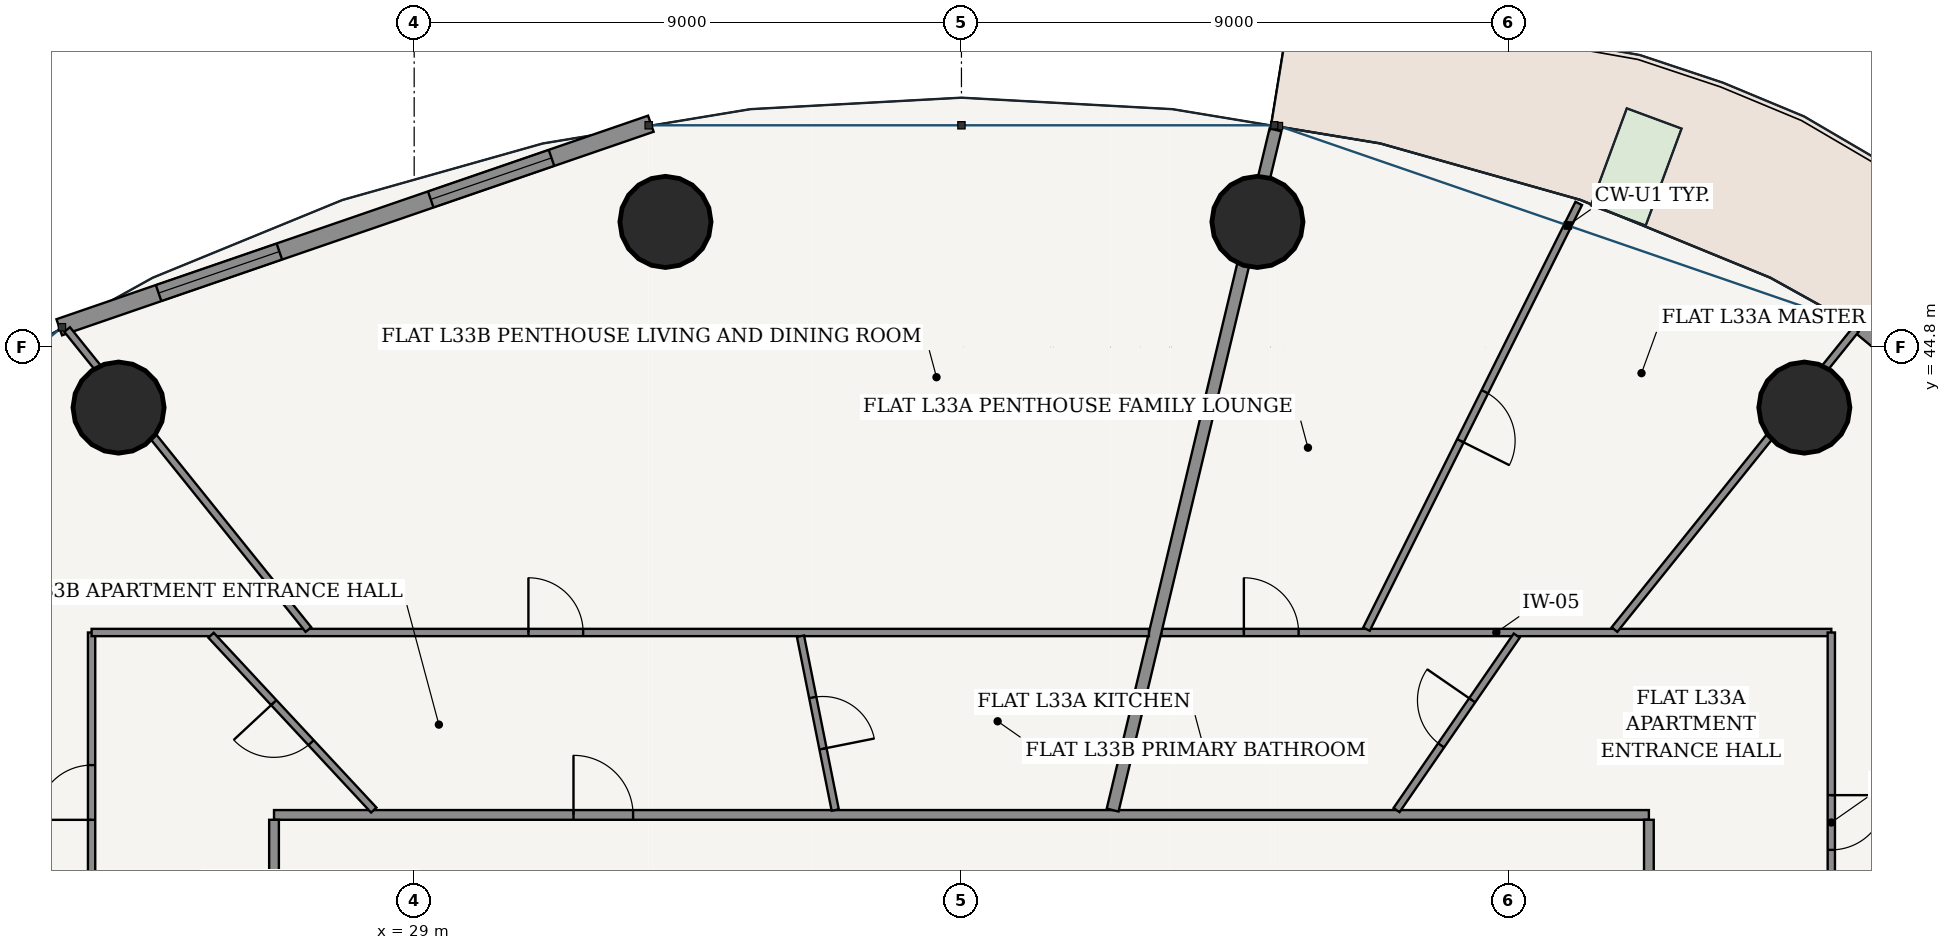
"""IFC4 building model, lengths in metres.
Left out: names, types, materials, properties, quantities, classifications, styles, units other than length and angle.
Written with IfcOpenShell. Run it as: python <this file> out.ifc"""

import sys

from ifc_helpers import new_model, si_unit, direction, frame, frame_2d, origin, origin_2d, place, context, subcontext, project, spatial, rectangle, hollow_circle, extrude, source, transform, mapped, element, fill, save


model = new_model("IFC4")
c1 = context("Model", 3, precision=1e-05, world=origin(), true_north=direction((-0.2419218956, 0.970295726276)))
c2 = subcontext(c1, "Body", "Model", "MODEL_VIEW")
j1 = project(units=[si_unit("LENGTHUNIT", "METRE"), si_unit("PLANEANGLEUNIT", "RADIAN")], contexts=[c1])
p1 = place(None, origin())
s1 = spatial("IfcSite", under=j1, at=p1, CompositionType="ELEMENT")
p2 = place(p1, origin())
s2 = spatial("IfcBuilding", under=s1, at=p2, CompositionType="ELEMENT")
p3 = place(p2, frame((0.0, 0.0, 126.6)))
s3 = spatial("IfcBuildingStorey", under=s2, at=p3, CompositionType="ELEMENT", Elevation=126.6)
for number, where, z_axis, x_axis in (
    (1, (51.862, 43.803, 0.0), (0.0, 0.0, 1.0), (1.0, 0.0, 0.0)),
    (2, (42.867, 46.857, 0.0), (0.0, 0.0, 1.0), (1.0, 0.0, 0.0)),
    (3, (33.133, 46.857, 0.0), (0.0, 0.0, 1.0), (1.0, 0.0, 0.0)),
    (4, (24.138, 43.803, 0.0), (0.0, 0.0, 1.0), (1.0, 0.0, 0.0)),
):
    element("IfcColumn", number, at=place(p3, frame(where, z_axis=z_axis, x_axis=x_axis)), inside=s3, PredefinedType="COLUMN", context=c2, shape_type="SweptSolid", body=[
        extrude(hollow_circle(Radius=0.75, WallThickness=0.045, at=origin_2d()), origin(), (0.0, 0.0, 1.0), 3.6),
    ])
p4 = place(p3, frame((60.154, 39.01, 0.0), z_axis=(0.0, 0.0, 1.0), x_axis=(-0.769242574941, 0.638956853706, 0.0)))
e5 = element("IfcWall", 5, at=p4, inside=s3, PredefinedType="SOLIDWALL", context=c2, shape_type="SweptSolid", body=[
    extrude(rectangle(XDim=9.69, YDim=0.26, at=frame_2d((4.845, 0.0))), origin(), (0.0, 0.0, 1.0), 3.15),
])
p5 = place(p4, frame((4.17, 0.0, 0.0)))
e6 = element("IfcOpeningElement", 6, at=p5, cuts=e5, PredefinedType="OPENING", context=c2, shape_type="SweptSolid", body=[
    extrude(rectangle(XDim=1.35, YDim=2.2, at=frame_2d((0.675, 1.1))), frame((0.0, 0.14, 0.0), z_axis=(0.0, -1.0, 0.0), x_axis=(1.0, 0.0, 0.0)), (0.0, 0.0, 1.0), 0.28),
])
p6 = place(p3, frame((32.892, 48.472, 0.0), z_axis=(0.0, 0.0, 1.0), x_axis=(-0.945597432299, -0.325339047809, 0.0)))
e7 = element("IfcWall", 7, at=p6, inside=s3, PredefinedType="SOLIDWALL", context=c2, shape_type="SweptSolid", body=[
    extrude(rectangle(XDim=10.289, YDim=0.28, at=frame_2d((5.145, 0.0))), origin(), (0.0, 0.0, 1.0), 3.15),
])
p7 = place(p6, frame((1.728, 0.0, 0.85)))
e8 = element("IfcOpeningElement", 8, at=p7, cuts=e7, PredefinedType="OPENING", context=c2, shape_type="SweptSolid", body=[
    extrude(rectangle(XDim=2.1, YDim=1.95, at=frame_2d((1.05, 0.975))), frame((0.0, 0.15, 0.0), z_axis=(0.0, -1.0, 0.0), x_axis=(1.0, 0.0, 0.0)), (0.0, 0.0, 1.0), 0.3),
])
p8 = place(p6, frame((6.461, 0.0, 0.85)))
e9 = element("IfcOpeningElement", 9, at=p8, cuts=e7, PredefinedType="OPENING", context=c2, shape_type="SweptSolid", body=[
    extrude(rectangle(XDim=2.1, YDim=1.95, at=frame_2d((1.05, 0.975))), frame((0.0, 0.15, 0.0), z_axis=(0.0, -1.0, 0.0), x_axis=(1.0, 0.0, 0.0)), (0.0, 0.0, 1.0), 0.3),
])
p9 = place(p3, frame((26.695, 37.105, 0.0), z_axis=(0.0, 0.0, 1.0), x_axis=(1.0, 0.0, 0.0)))
e10 = element("IfcWall", 10, at=p9, inside=s3, PredefinedType="PARTITIONING", context=c2, shape_type="SweptSolid", body=[
    extrude(rectangle(XDim=22.61, YDim=0.16, at=frame_2d((11.305, 0.0))), origin(), (0.0, 0.0, 1.0), 2.596),
])
p10 = place(p9, frame((4.925, 0.0, 0.0)))
e11 = element("IfcOpeningElement", 11, at=p10, cuts=e10, PredefinedType="OPENING", context=c2, shape_type="SweptSolid", body=[
    extrude(rectangle(XDim=0.98, YDim=2.2, at=frame_2d((0.49, 1.1))), frame((0.0, 0.09, 0.0), z_axis=(0.0, -1.0, 0.0), x_axis=(1.0, 0.0, 0.0)), (0.0, 0.0, 1.0), 0.18),
])
p11 = place(p3, frame((26.695, 16.575, 0.0), z_axis=(0.0, 0.0, 1.0), x_axis=(0.0, 1.0, 0.0)))
e12 = element("IfcWall", 12, at=p11, inside=s3, PredefinedType="PARTITIONING", context=c2, shape_type="SweptSolid", body=[
    extrude(rectangle(XDim=20.45, YDim=0.16, at=frame_2d((10.225, 0.0))), origin(), (0.0, 0.0, 1.0), 2.596),
])
p12 = place(p11, frame((9.547, 0.0, 0.0)))
e13 = element("IfcOpeningElement", 13, at=p12, cuts=e12, PredefinedType="OPENING", context=c2, shape_type="SweptSolid", body=[
    extrude(rectangle(XDim=0.98, YDim=2.2, at=frame_2d((0.49, 1.1))), frame((0.0, 0.09, 0.0), z_axis=(0.0, -1.0, 0.0), x_axis=(1.0, 0.0, 0.0)), (0.0, 0.0, 1.0), 0.18),
])
p13 = place(p3, frame((49.305, 16.575, 0.0), z_axis=(0.0, 0.0, 1.0), x_axis=(0.0, 1.0, 0.0)))
e14 = element("IfcWall", 14, at=p13, inside=s3, PredefinedType="PARTITIONING", context=c2, shape_type="SweptSolid", body=[
    extrude(rectangle(XDim=20.45, YDim=0.16, at=frame_2d((10.225, 0.0))), origin(), (0.0, 0.0, 1.0), 2.596),
])
p14 = place(p13, frame((17.66, 0.0, 0.0)))
e15 = element("IfcOpeningElement", 15, at=p14, cuts=e14, PredefinedType="OPENING", context=c2, shape_type="SweptSolid", body=[
    extrude(rectangle(XDim=0.98, YDim=2.2, at=frame_2d((0.49, 1.1))), frame((0.0, 0.09, 0.0), z_axis=(0.0, -1.0, 0.0), x_axis=(1.0, 0.0, 0.0)), (0.0, 0.0, 1.0), 0.18),
])
p15 = place(p13, frame((1.374, 0.0, 0.0)))
e16 = element("IfcOpeningElement", 16, at=p15, cuts=e14, PredefinedType="OPENING", context=c2, shape_type="SweptSolid", body=[
    extrude(rectangle(XDim=0.98, YDim=2.2, at=frame_2d((0.49, 1.1))), frame((0.0, 0.09, 0.0), z_axis=(0.0, -1.0, 0.0), x_axis=(1.0, 0.0, 0.0)), (0.0, 0.0, 1.0), 0.18),
])
p16 = place(p3, frame((41.287, 40.105, 0.0), z_axis=(0.0, 0.0, 1.0), x_axis=(1.0, 0.0, 0.0)))
e17 = element("IfcWall", 17, at=p16, inside=s3, PredefinedType="PARTITIONING", context=c2, shape_type="SweptSolid", body=[
    extrude(rectangle(XDim=11.018, YDim=0.12, at=frame_2d((5.509, 0.0))), origin(), (0.0, 0.0, 1.0), 2.596),
])
p17 = place(p16, frame((1.357, 0.0, 0.0)))
e18 = element("IfcOpeningElement", 18, at=p17, cuts=e17, PredefinedType="OPENING", context=c2, shape_type="SweptSolid", body=[
    extrude(rectangle(XDim=0.9, YDim=2.15, at=frame_2d((0.45, 1.075))), frame((0.0, 0.07, 0.0), z_axis=(0.0, -1.0, 0.0), x_axis=(1.0, 0.0, 0.0)), (0.0, 0.0, 1.0), 0.14),
])
p18 = place(p3, frame((52.305, 40.105, 0.0), z_axis=(0.0, 0.0, 1.0), x_axis=(0.0, -1.0, 0.0)))
e19 = element("IfcWall", 19, at=p18, inside=s3, PredefinedType="PARTITIONING", context=c2, shape_type="SweptSolid", body=[
    extrude(rectangle(XDim=10.839, YDim=0.12, at=frame_2d((5.419, 0.0))), origin(), (0.0, 0.0, 1.0), 2.596),
])
p19 = place(p18, frame((2.675, 0.0, 0.0)))
e20 = element("IfcOpeningElement", 20, at=p19, cuts=e19, PredefinedType="OPENING", context=c2, shape_type="SweptSolid", body=[
    extrude(rectangle(XDim=0.9, YDim=2.15, at=frame_2d((0.45, 1.075))), frame((0.0, 0.07, 0.0), z_axis=(0.0, -1.0, 0.0), x_axis=(1.0, 0.0, 0.0)), (0.0, 0.0, 1.0), 0.14),
])
p20 = place(p3, frame((48.739, 40.153, 0.0), z_axis=(0.0, 0.0, 1.0), x_axis=(0.626714875168, 0.779248654309, 0.0)))
e21 = element("IfcWall", 21, at=p20, inside=s3, PredefinedType="PARTITIONING", context=c2, shape_type="SweptSolid", body=[
    extrude(rectangle(XDim=6.332, YDim=0.12, at=frame_2d((3.166, 0.0))), origin(), (0.0, 0.0, 1.0), 2.5),
])
p21 = place(p3, frame((44.661, 40.16, 0.0), z_axis=(0.0, 0.0, 1.0), x_axis=(0.446177198157, 0.894944639542, 0.0)))
e22 = element("IfcWall", 22, at=p21, inside=s3, PredefinedType="PARTITIONING", context=c2, shape_type="SweptSolid", body=[
    extrude(rectangle(XDim=7.823, YDim=0.12, at=frame_2d((3.912, 0.0))), origin(), (0.0, 0.0, 1.0), 2.666),
])
p22 = place(p21, frame((3.461, 0.0, 0.0)))
e23 = element("IfcOpeningElement", 23, at=p22, cuts=e22, PredefinedType="OPENING", context=c2, shape_type="SweptSolid", body=[
    extrude(rectangle(XDim=0.9, YDim=2.15, at=frame_2d((0.45, 1.075))), frame((0.0, 0.07, 0.0), z_axis=(0.0, -1.0, 0.0), x_axis=(1.0, 0.0, 0.0)), (0.0, 0.0, 1.0), 0.14),
])
p23 = place(p3, frame((45.155, 37.185, 0.0), z_axis=(0.0, 0.0, 1.0), x_axis=(0.567393940912, 0.82344648631, 0.0)))
e24 = element("IfcWall", 24, at=p23, inside=s3, PredefinedType="PARTITIONING", context=c2, shape_type="SweptSolid", body=[
    extrude(rectangle(XDim=3.484, YDim=0.12, at=frame_2d((1.742, 0.0))), origin(), (0.0, 0.0, 1.0), 2.825),
])
p24 = place(p23, frame((1.292, 0.0, 0.0)))
e25 = element("IfcOpeningElement", 25, at=p24, cuts=e24, PredefinedType="OPENING", context=c2, shape_type="SweptSolid", body=[
    extrude(rectangle(XDim=0.9, YDim=2.15, at=frame_2d((0.45, 1.075))), frame((0.0, 0.07, 0.0), z_axis=(0.0, -1.0, 0.0), x_axis=(1.0, 0.0, 0.0)), (0.0, 0.0, 1.0), 0.14),
])
p25 = place(p3, frame((40.486, 37.185, 0.0), z_axis=(0.0, 0.0, 1.0), x_axis=(0.232834224261, 0.972516438942, 0.0)))
e26 = element("IfcWall", 26, at=p25, inside=s3, PredefinedType="PARTITIONING", context=c2, shape_type="SweptSolid", body=[
    extrude(rectangle(XDim=11.502, YDim=0.2, at=frame_2d((5.751, 0.0))), origin(), (0.0, 0.0, 1.0), 2.5),
])
p26 = place(p3, frame((23.695, 34.843, 0.0), z_axis=(0.0, 0.0, 1.0), x_axis=(0.0, 1.0, 0.0)))
e27 = element("IfcWall", 27, at=p26, inside=s3, PredefinedType="PARTITIONING", context=c2, shape_type="SweptSolid", body=[
    extrude(rectangle(XDim=5.262, YDim=0.12, at=frame_2d((2.631, 0.0))), origin(), (0.0, 0.0, 1.0), 2.596),
])
p27 = place(p26, frame((2.181, 0.0, 0.0)))
e28 = element("IfcOpeningElement", 28, at=p27, cuts=e27, PredefinedType="OPENING", context=c2, shape_type="SweptSolid", body=[
    extrude(rectangle(XDim=0.9, YDim=2.15, at=frame_2d((0.45, 1.075))), frame((0.0, 0.07, 0.0), z_axis=(0.0, -1.0, 0.0), x_axis=(1.0, 0.0, 0.0)), (0.0, 0.0, 1.0), 0.14),
])
p28 = place(p3, frame((23.695, 40.105, 0.0), z_axis=(0.0, 0.0, 1.0), x_axis=(1.0, 0.0, 0.0)))
e29 = element("IfcWall", 29, at=p28, inside=s3, PredefinedType="PARTITIONING", context=c2, shape_type="SweptSolid", body=[
    extrude(rectangle(XDim=17.388, YDim=0.12, at=frame_2d((8.694, 0.0))), origin(), (0.0, 0.0, 1.0), 2.596),
])
p29 = place(p28, frame((7.184, 0.0, 0.0)))
e30 = element("IfcOpeningElement", 30, at=p29, cuts=e29, PredefinedType="OPENING", context=c2, shape_type="SweptSolid", body=[
    extrude(rectangle(XDim=0.9, YDim=2.15, at=frame_2d((0.45, 1.075))), frame((0.0, 0.07, 0.0), z_axis=(0.0, -1.0, 0.0), x_axis=(1.0, 0.0, 0.0)), (0.0, 0.0, 1.0), 0.14),
])
p30 = place(p3, frame((27.261, 40.153, 0.0), z_axis=(0.0, 0.0, 1.0), x_axis=(-0.626714875168, 0.779248654309, 0.0)))
e31 = element("IfcWall", 31, at=p30, inside=s3, PredefinedType="PARTITIONING", context=c2, shape_type="SweptSolid", body=[
    extrude(rectangle(XDim=6.332, YDim=0.12, at=frame_2d((3.166, 0.0))), origin(), (0.0, 0.0, 1.0), 2.5),
])
p31 = place(p3, frame((35.925, 37.185, 0.0), z_axis=(0.0, 0.0, 1.0), x_axis=(-0.196019518907, 0.980599993987, 0.0)))
e32 = element("IfcWall", 32, at=p31, inside=s3, PredefinedType="PARTITIONING", context=c2, shape_type="SweptSolid", body=[
    extrude(rectangle(XDim=2.916, YDim=0.12, at=frame_2d((1.458, 0.0))), origin(), (0.0, 0.0, 1.0), 3.15),
])
p32 = place(p31, frame((1.028, 0.0, 0.0)))
e33 = element("IfcOpeningElement", 33, at=p32, cuts=e32, PredefinedType="OPENING", context=c2, shape_type="SweptSolid", body=[
    extrude(rectangle(XDim=0.86, YDim=2.15, at=frame_2d((0.43, 1.075))), frame((0.0, 0.07, 0.0), z_axis=(0.0, -1.0, 0.0), x_axis=(1.0, 0.0, 0.0)), (0.0, 0.0, 1.0), 0.14),
])
p33 = place(p3, frame((28.335, 37.185, 0.0), z_axis=(0.0, 0.0, 1.0), x_axis=(-0.681251984121, 0.732048997083, 0.0)))
e34 = element("IfcWall", 34, at=p33, inside=s3, PredefinedType="PARTITIONING", context=c2, shape_type="SweptSolid", body=[
    extrude(rectangle(XDim=3.927, YDim=0.12, at=frame_2d((1.963, 0.0))), origin(), (0.0, 0.0, 1.0), 2.596),
])
p34 = place(p33, frame((1.513, 0.0, 0.0)))
e35 = element("IfcOpeningElement", 35, at=p34, cuts=e34, PredefinedType="OPENING", context=c2, shape_type="SweptSolid", body=[
    extrude(rectangle(XDim=0.9, YDim=2.15, at=frame_2d((0.45, 1.075))), frame((0.0, 0.07, 0.0), z_axis=(0.0, -1.0, 0.0), x_axis=(1.0, 0.0, 0.0)), (0.0, 0.0, 1.0), 0.14),
])
p35 = place(p3, frame((26.615, 33.12, 0.0), z_axis=(0.0, 0.0, 1.0), x_axis=(-0.874319192772, 0.485351366692, 0.0)))
e36 = element("IfcWall", 36, at=p35, inside=s3, PredefinedType="PARTITIONING", context=c2, shape_type="SweptSolid", body=[
    extrude(rectangle(XDim=12.158, YDim=0.2, at=frame_2d((6.079, 0.0))), origin(), (0.0, 0.0, 1.0), 2.5),
])
m1 = source(origin(), c2, "Body", "SweptSolid", [
    extrude(rectangle(XDim=2.1, YDim=1.95, at=frame_2d((1.05, 0.975))), frame((0.0, 0.03, 0.0), z_axis=(0.0, -1.0, 0.0), x_axis=(1.0, 0.0, 0.0)), (0.0, 0.0, 1.0), 0.06),
])
p36 = place(p7, origin())
e37 = element("IfcWindow", 37, at=p36, inside=s3, PartitioningType="SINGLE_PANEL", PredefinedType="WINDOW", context=c2, shape_type="MappedRepresentation", body=[
    mapped(m1, transform((0.0, 0.0, 0.0), scale=1.0)),
])
fill(e8, e37)
p37 = place(p8, origin())
e38 = element("IfcWindow", 38, at=p37, inside=s3, PartitioningType="SINGLE_PANEL", PredefinedType="WINDOW", context=c2, shape_type="MappedRepresentation", body=[
    mapped(m1, transform((0.0, 0.0, 0.0), scale=1.0)),
])
fill(e9, e38)
m2 = source(origin(), c2, "Body", "SweptSolid", [
    extrude(rectangle(XDim=0.9, YDim=2.15, at=frame_2d((0.45, 1.075))), frame((0.0, 0.025, 0.0), z_axis=(0.0, -1.0, 0.0), x_axis=(1.0, 0.0, 0.0)), (0.0, 0.0, 1.0), 0.05),
])
p38 = place(p19, origin())
e39 = element("IfcDoor", 39, at=p38, inside=s3, OperationType="SINGLE_SWING_LEFT", PredefinedType="DOOR", context=c2, shape_type="MappedRepresentation", body=[
    mapped(m2, transform((0.0, 0.0, 0.0), scale=1.0)),
])
fill(e20, e39)
p39 = place(p24, origin())
e40 = element("IfcDoor", 40, at=p39, inside=s3, OperationType="SINGLE_SWING_RIGHT", PredefinedType="DOOR", context=c2, shape_type="MappedRepresentation", body=[
    mapped(m2, transform((0.0, 0.0, 0.0), scale=1.0)),
])
fill(e25, e40)
p40 = place(p17, origin())
e41 = element("IfcDoor", 41, at=p40, inside=s3, OperationType="SINGLE_SWING_LEFT", PredefinedType="DOOR", context=c2, shape_type="MappedRepresentation", body=[
    mapped(m2, transform((0.0, 0.0, 0.0), scale=1.0)),
])
fill(e18, e41)
p41 = place(p22, frame((0.9, 0.0, 0.0), z_axis=(0.0, 0.0, 1.0), x_axis=(-1.0, 0.0, 0.0)))
e42 = element("IfcDoor", 42, at=p41, inside=s3, OperationType="SINGLE_SWING_RIGHT", PredefinedType="DOOR", context=c2, shape_type="MappedRepresentation", body=[
    mapped(m2, transform((0.0, 0.0, 0.0), scale=1.0)),
])
fill(e23, e42)
m3 = source(origin(), c2, "Body", "SweptSolid", [
    extrude(rectangle(XDim=0.98, YDim=2.2, at=frame_2d((0.49, 1.1))), frame((0.0, 0.025, 0.0), z_axis=(0.0, -1.0, 0.0), x_axis=(1.0, 0.0, 0.0)), (0.0, 0.0, 1.0), 0.05),
])
p42 = place(p10, origin())
e43 = element("IfcDoor", 43, at=p42, inside=s3, OperationType="SINGLE_SWING_LEFT", PredefinedType="DOOR", context=c2, shape_type="MappedRepresentation", body=[
    mapped(m3, transform((0.0, 0.0, 0.0), scale=1.0)),
])
fill(e11, e43)
m4 = source(origin(), c2, "Body", "SweptSolid", [
    extrude(rectangle(XDim=0.86, YDim=2.15, at=frame_2d((0.43, 1.075))), frame((0.0, 0.025, 0.0), z_axis=(0.0, -1.0, 0.0), x_axis=(1.0, 0.0, 0.0)), (0.0, 0.0, 1.0), 0.05),
])
p43 = place(p32, frame((0.86, 0.0, 0.0), z_axis=(0.0, 0.0, 1.0), x_axis=(-1.0, 0.0, 0.0)))
e44 = element("IfcDoor", 44, at=p43, inside=s3, OperationType="SINGLE_SWING_RIGHT", PredefinedType="DOOR", context=c2, shape_type="MappedRepresentation", body=[
    mapped(m4, transform((0.0, 0.0, 0.0), scale=1.0)),
])
fill(e33, e44)
p44 = place(p29, origin())
e45 = element("IfcDoor", 45, at=p44, inside=s3, OperationType="SINGLE_SWING_LEFT", PredefinedType="DOOR", context=c2, shape_type="MappedRepresentation", body=[
    mapped(m2, transform((0.0, 0.0, 0.0), scale=1.0)),
])
fill(e30, e45)
p45 = place(p34, origin())
e46 = element("IfcDoor", 46, at=p45, inside=s3, OperationType="SINGLE_SWING_RIGHT", PredefinedType="DOOR", context=c2, shape_type="MappedRepresentation", body=[
    mapped(m2, transform((0.0, 0.0, 0.0), scale=1.0)),
])
fill(e35, e46)
p46 = place(p27, origin())
e47 = element("IfcDoor", 47, at=p46, inside=s3, OperationType="SINGLE_SWING_LEFT", PredefinedType="DOOR", context=c2, shape_type="MappedRepresentation", body=[
    mapped(m2, transform((0.0, 0.0, 0.0), scale=1.0)),
])
fill(e28, e47)
save(model, sys.argv[1])
